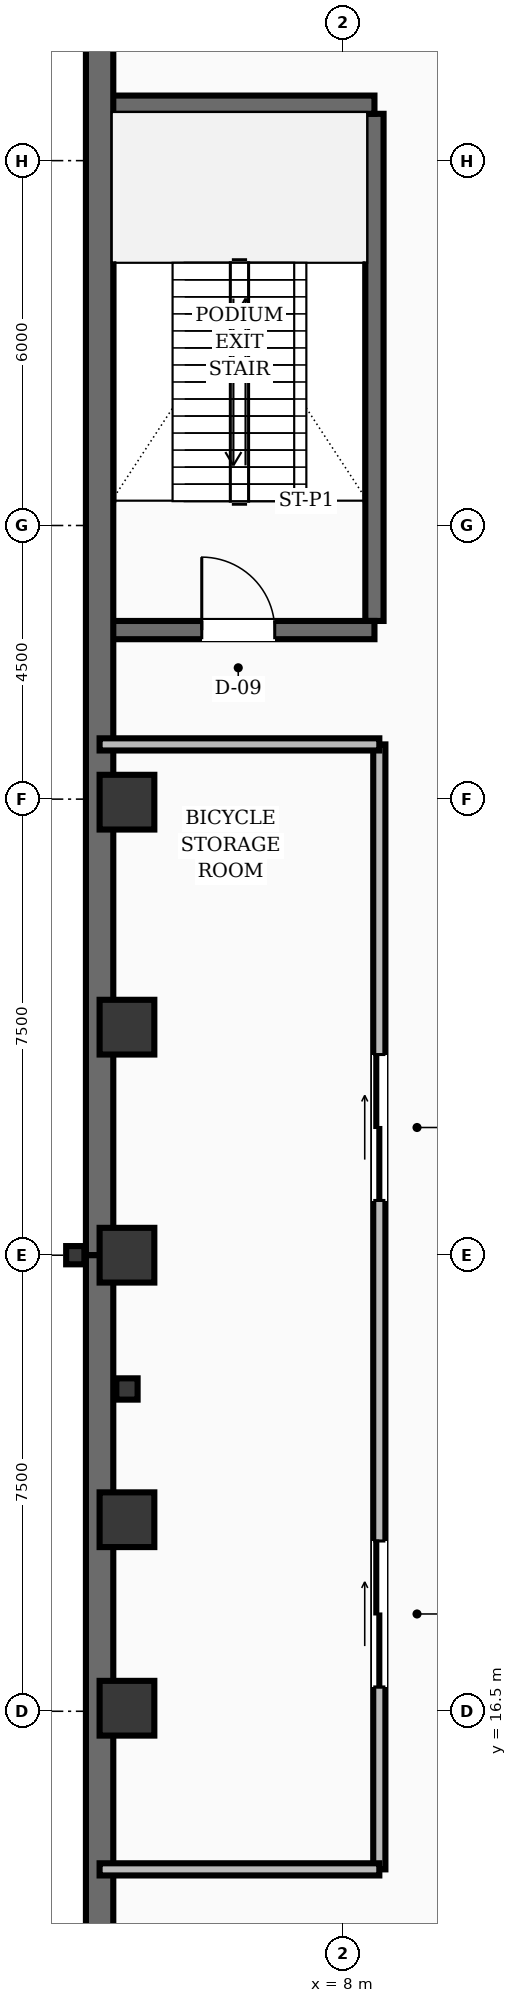
"""IFC4 building model, lengths in metres.
Left out: names, types, materials, properties, quantities, classifications, styles, units other than length and angle.
Written with IfcOpenShell. Run it as: python <this file> out.ifc"""

import sys

from ifc_helpers import new_model, si_unit, direction, frame, frame_2d, origin, origin_2d, place, context, subcontext, project, spatial, rectangle, hollow_rectangle, i_section, extrude, element, fill, save


model = new_model("IFC4")
c1 = context("Model", 3, precision=1e-05, world=origin(), true_north=direction((0.0, 1.0)))
c2 = subcontext(c1, "Body", "Model", "MODEL_VIEW")
j1 = project(units=[si_unit("LENGTHUNIT", "METRE"), si_unit("PLANEANGLEUNIT", "RADIAN")], contexts=[c1])
p1 = place(None, origin())
s1 = spatial("IfcSite", under=j1, at=p1, CompositionType="ELEMENT")
p2 = place(p1, origin())
s2 = spatial("IfcBuilding", under=s1, at=p2, CompositionType="ELEMENT")
p3 = place(p2, frame((0.0, 0.0, -5.2)))
s3 = spatial("IfcBuildingStorey", under=s2, at=p3, CompositionType="ELEMENT", Elevation=-5.2)
p4 = place(p3, frame((8.52, 34.43, 0.0), z_axis=(0.0, 0.0, 1.0), x_axis=(0.0, 1.0, 0.0)))
e1 = element("IfcWall", 1, at=p4, inside=s3, PredefinedType="SHEAR", context=c2, shape_type="SweptSolid", body=[
    extrude(rectangle(XDim=8.34, YDim=0.3, at=frame_2d((4.17, 0.0))), origin(), (0.0, 0.0, 1.0), 5.2),
])
p5 = place(p3, frame((4.08, 34.28, 0.0), z_axis=(0.0, 0.0, 1.0), x_axis=(1.0, 0.0, 0.0)))
e2 = element("IfcWall", 2, at=p5, inside=s3, PredefinedType="SHEAR", context=c2, shape_type="SweptSolid", body=[
    extrude(rectangle(XDim=4.44, YDim=0.3, at=frame_2d((2.22, 0.0))), origin(), (0.0, 0.0, 1.0), 5.2),
])
p6 = place(p5, frame((1.6, 0.0, 0.0)))
e3 = element("IfcOpeningElement", 3, at=p6, cuts=e2, PredefinedType="OPENING", context=c2, shape_type="SweptSolid", body=[
    extrude(rectangle(XDim=1.2, YDim=2.1, at=frame_2d((0.6, 1.05))), frame((0.0, 0.16, 0.0), z_axis=(0.0, -1.0, 0.0), x_axis=(1.0, 0.0, 0.0)), (0.0, 0.0, 1.0), 0.32),
])
p7 = place(p3, frame((4.08, 42.92, 0.0), z_axis=(0.0, 0.0, 1.0), x_axis=(1.0, 0.0, 0.0)))
e4 = element("IfcWall", 4, at=p7, inside=s3, PredefinedType="SHEAR", context=c2, shape_type="SweptSolid", body=[
    extrude(rectangle(XDim=4.44, YDim=0.3, at=frame_2d((2.22, 0.0))), origin(), (0.0, 0.0, 1.0), 5.2),
])
for number, where, z_axis, x_axis in (
    (5, (4.0, 45.0, 0.0), (0.0, 0.0, 1.0), (0.0, -1.0, 0.0)),
    (6, (4.0, 24.0, 0.0), (0.0, 0.0, 1.0), (0.0, -1.0, 0.0)),
):
    element("IfcWall", number, at=place(p3, frame(where, z_axis=z_axis, x_axis=x_axis)), inside=s3, PredefinedType="USERDEFINED", context=c2, shape_type="SweptSolid", body=[
        extrude(rectangle(XDim=21.0, YDim=0.45, at=frame_2d((10.5, 0.0))), origin(), (0.0, 0.0, 1.0), 5.2),
    ])
for number, where, z_axis, x_axis in (
    (7, (4.45, 16.55, 0.0), (0.0, 0.0, 1.0), (1.0, 0.0, 0.0)),
    (8, (4.45, 19.65, 0.0), (0.0, 0.0, 1.0), (1.0, 0.0, 0.0)),
    (9, (4.45, 24.0, 0.0), (0.0, 0.0, 1.0), (1.0, 0.0, 0.0)),
    (10, (4.45, 27.75, 0.0), (0.0, 0.0, 1.0), (1.0, 0.0, 0.0)),
    (11, (4.45, 31.45, 0.0), (0.0, 0.0, 1.0), (1.0, 0.0, 0.0)),
):
    element("IfcColumn", number, at=place(p3, frame(where, z_axis=z_axis, x_axis=x_axis)), inside=s3, PredefinedType="COLUMN", context=c2, shape_type="SweptSolid", body=[
        extrude(rectangle(XDim=0.9, YDim=0.9, at=origin_2d()), origin(), (0.0, 0.0, 1.0), 5.2),
    ])
p8 = place(p3, frame((4.45, 21.8, 0.0), z_axis=(0.0, 0.0, 1.0), x_axis=(1.0, 0.0, 0.0)))
e12 = element("IfcColumn", 12, at=p8, inside=s3, PredefinedType="PILASTER", context=c2, shape_type="SweptSolid", body=[
    extrude(hollow_rectangle(XDim=0.35, YDim=0.35, WallThickness=0.016, at=origin_2d()), origin(), (0.0, 0.0, 1.0), 5.2),
])
p9 = place(p3, frame((3.6, 24.0, 0.0), z_axis=(0.0, 0.0, 1.0), x_axis=(1.0, 0.0, 0.0)))
e13 = element("IfcColumn", 13, at=p9, inside=s3, PredefinedType="COLUMN", context=c2, shape_type="SweptSolid", body=[
    extrude(i_section(OverallWidth=0.3, OverallDepth=0.3, WebThickness=0.01, FlangeThickness=0.015, FilletRadius=0.013, at=origin_2d()), origin(), (0.0, 0.0, 1.0), 4.95),
])
p10 = place(p3, frame((8.6, 13.9, 0.0), z_axis=(0.0, 0.0, 1.0), x_axis=(0.0, 1.0, 0.0)))
e14 = element("IfcWall", 14, at=p10, inside=s3, PredefinedType="SOLIDWALL", context=c2, shape_type="SweptSolid", body=[
    extrude(rectangle(XDim=18.5, YDim=0.2, at=frame_2d((9.25, 0.0))), origin(), (0.0, 0.0, 1.0), 3.92),
])
p11 = place(p10, frame((3.0, 0.0, 0.0)))
e15 = element("IfcOpeningElement", 15, at=p11, cuts=e14, PredefinedType="OPENING", context=c2, shape_type="SweptSolid", body=[
    extrude(rectangle(XDim=2.4, YDim=2.2, at=frame_2d((1.2, 1.1))), frame((0.0, 0.11, 0.0), z_axis=(0.0, -1.0, 0.0), x_axis=(1.0, 0.0, 0.0)), (0.0, 0.0, 1.0), 0.22),
])
p12 = place(p10, frame((11.0, 0.0, 0.0)))
e16 = element("IfcOpeningElement", 16, at=p12, cuts=e14, PredefinedType="OPENING", context=c2, shape_type="SweptSolid", body=[
    extrude(rectangle(XDim=2.4, YDim=2.2, at=frame_2d((1.2, 1.1))), frame((0.0, 0.11, 0.0), z_axis=(0.0, -1.0, 0.0), x_axis=(1.0, 0.0, 0.0)), (0.0, 0.0, 1.0), 0.22),
])
for number, where, z_axis, x_axis in (
    (17, (4.0, 13.9, 0.0), (0.0, 0.0, 1.0), (1.0, 0.0, 0.0)),
    (18, (4.0, 32.4, 0.0), (0.0, 0.0, 1.0), (1.0, 0.0, 0.0)),
):
    element("IfcWall", number, at=place(p3, frame(where, z_axis=z_axis, x_axis=x_axis)), inside=s3, PredefinedType="SOLIDWALL", context=c2, shape_type="SweptSolid", body=[
        extrude(rectangle(XDim=4.6, YDim=0.2, at=frame_2d((2.3, 0.0))), origin(), (0.0, 0.0, 1.0), 3.92),
    ])
p13 = place(p6, origin())
e19 = element("IfcDoor", 19, at=p13, inside=s3, OperationType="SINGLE_SWING_LEFT", PredefinedType="DOOR", context=c2, shape_type="SweptSolid", body=[
    extrude(rectangle(XDim=1.2, YDim=2.1, at=frame_2d((0.6, 1.05))), frame((0.0, 0.025, 0.0), z_axis=(0.0, -1.0, 0.0), x_axis=(1.0, 0.0, 0.0)), (0.0, 0.0, 1.0), 0.05),
])
fill(e3, e19)
p14 = place(p11, origin())
e20 = element("IfcDoor", 20, at=p14, inside=s3, OperationType="ROLLINGUP", PredefinedType="GATE", context=c2, shape_type="SweptSolid", body=[
    extrude(rectangle(XDim=2.4, YDim=2.2, at=frame_2d((1.2, 1.1))), frame((0.0, 0.025, 0.0), z_axis=(0.0, -1.0, 0.0), x_axis=(1.0, 0.0, 0.0)), (0.0, 0.0, 1.0), 0.05),
])
fill(e15, e20)
p15 = place(p12, origin())
e21 = element("IfcDoor", 21, at=p15, inside=s3, OperationType="ROLLINGUP", PredefinedType="GATE", context=c2, shape_type="SweptSolid", body=[
    extrude(rectangle(XDim=2.4, YDim=2.2, at=frame_2d((1.2, 1.1))), frame((0.0, 0.025, 0.0), z_axis=(0.0, -1.0, 0.0), x_axis=(1.0, 0.0, 0.0)), (0.0, 0.0, 1.0), 0.05),
])
fill(e16, e21)
save(model, sys.argv[1])
